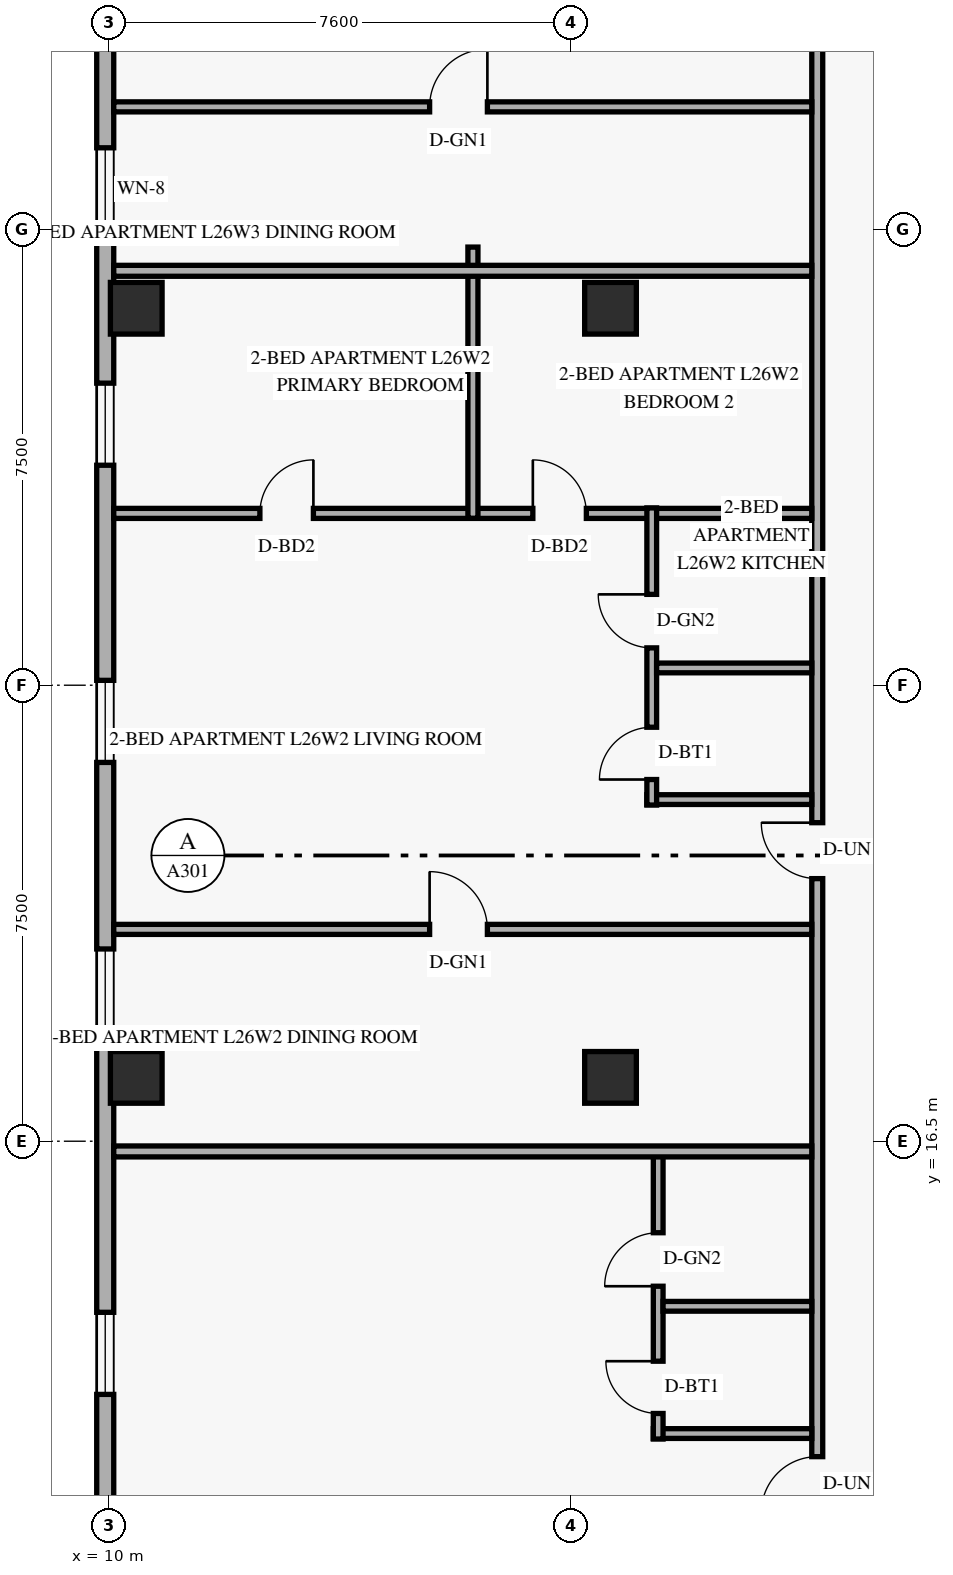
"""IFC4 building model, lengths in metres.
Left out: names, types, materials, properties, quantities, classifications, styles, units other than length and angle.
Written with IfcOpenShell. Run it as: python <this file> out.ifc"""

import sys

from ifc_helpers import new_model, si_unit, direction, frame, frame_2d, origin, origin_2d, place, context, subcontext, project, spatial, rectangle, extrude, element, fill, save


model = new_model("IFC4")
c1 = context("Model", 3, precision=1e-05, world=origin(), true_north=direction((0.0, 1.0)))
c2 = subcontext(c1, "Body", "Model", "MODEL_VIEW")
j1 = project(units=[si_unit("LENGTHUNIT", "METRE"), si_unit("PLANEANGLEUNIT", "RADIAN")], contexts=[c1])
p1 = place(None, origin())
s1 = spatial("IfcSite", under=j1, at=p1, CompositionType="ELEMENT")
p2 = place(p1, origin())
s2 = spatial("IfcBuilding", under=s1, at=p2, CompositionType="ELEMENT")
p3 = place(p2, frame((0.0, 0.0, 102.6)))
s3 = spatial("IfcBuildingStorey", under=s2, at=p3, CompositionType="ELEMENT", Elevation=102.6)
for number, where, z_axis, x_axis in (
    (1, (10.45, 17.55, 0.0), (0.0, 0.0, 1.0), (1.0, 0.0, 0.0)),
    (2, (10.45, 30.2, 0.0), (0.0, 0.0, 1.0), (1.0, 0.0, 0.0)),
    (3, (18.25, 17.55, 0.0), (0.0, 0.0, 1.0), (1.0, 0.0, 0.0)),
    (4, (18.25, 30.2, 0.0), (0.0, 0.0, 1.0), (1.0, 0.0, 0.0)),
):
    element("IfcColumn", number, at=place(p3, frame(where, z_axis=z_axis, x_axis=x_axis)), inside=s3, PredefinedType="COLUMN", context=c2, shape_type="SweptSolid", body=[
        extrude(rectangle(XDim=0.85, YDim=0.85, at=origin_2d()), origin(), (0.0, 0.0, 1.0), 3.6),
    ])
p4 = place(p3, frame((9.94, 41.68, 0.0), z_axis=(0.0, 0.0, 1.0), x_axis=(0.0, -1.0, 0.0)))
e5 = element("IfcWall", 5, at=p4, inside=s3, PredefinedType="SOLIDWALL", context=c2, shape_type="SweptSolid", body=[
    extrude(rectangle(XDim=35.36, YDim=0.28, at=frame_2d((17.68, 0.0))), origin(), (0.0, 0.0, 1.0), 3.36),
])
p5 = place(p4, frame((27.994, 0.0, 0.85)))
e6 = element("IfcOpeningElement", 6, at=p5, cuts=e5, PredefinedType="OPENING", context=c2, shape_type="SweptSolid", body=[
    extrude(rectangle(XDim=1.35, YDim=1.55, at=frame_2d((0.675, 0.775))), frame((0.0, 0.15, 0.0), z_axis=(0.0, -1.0, 0.0), x_axis=(1.0, 0.0, 0.0)), (0.0, 0.0, 1.0), 0.3),
])
p6 = place(p4, frame((22.018, 0.0, 0.85)))
e7 = element("IfcOpeningElement", 7, at=p6, cuts=e5, PredefinedType="OPENING", context=c2, shape_type="SweptSolid", body=[
    extrude(rectangle(XDim=1.35, YDim=1.55, at=frame_2d((0.675, 0.775))), frame((0.0, 0.15, 0.0), z_axis=(0.0, -1.0, 0.0), x_axis=(1.0, 0.0, 0.0)), (0.0, 0.0, 1.0), 0.3),
])
p7 = place(p4, frame((17.6, 0.0, 0.85)))
e8 = element("IfcOpeningElement", 8, at=p7, cuts=e5, PredefinedType="OPENING", context=c2, shape_type="SweptSolid", body=[
    extrude(rectangle(XDim=1.35, YDim=1.55, at=frame_2d((0.675, 0.775))), frame((0.0, 0.15, 0.0), z_axis=(0.0, -1.0, 0.0), x_axis=(1.0, 0.0, 0.0)), (0.0, 0.0, 1.0), 0.3),
])
p8 = place(p4, frame((12.712, 0.0, 0.85)))
e9 = element("IfcOpeningElement", 9, at=p8, cuts=e5, PredefinedType="OPENING", context=c2, shape_type="SweptSolid", body=[
    extrude(rectangle(XDim=1.35, YDim=1.55, at=frame_2d((0.675, 0.775))), frame((0.0, 0.15, 0.0), z_axis=(0.0, -1.0, 0.0), x_axis=(1.0, 0.0, 0.0)), (0.0, 0.0, 1.0), 0.3),
])
p9 = place(p4, frame((8.841, 0.0, 0.85)))
e10 = element("IfcOpeningElement", 10, at=p9, cuts=e5, PredefinedType="OPENING", context=c2, shape_type="SweptSolid", body=[
    extrude(rectangle(XDim=1.35, YDim=1.55, at=frame_2d((0.675, 0.775))), frame((0.0, 0.15, 0.0), z_axis=(0.0, -1.0, 0.0), x_axis=(1.0, 0.0, 0.0)), (0.0, 0.0, 1.0), 0.3),
])
p10 = place(p4, frame((5.094, 0.0, 0.85)))
e11 = element("IfcOpeningElement", 11, at=p10, cuts=e5, PredefinedType="OPENING", context=c2, shape_type="SweptSolid", body=[
    extrude(rectangle(XDim=1.35, YDim=1.55, at=frame_2d((0.675, 0.775))), frame((0.0, 0.15, 0.0), z_axis=(0.0, -1.0, 0.0), x_axis=(1.0, 0.0, 0.0)), (0.0, 0.0, 1.0), 0.3),
])
p11 = place(p3, frame((21.65, 6.8, 0.0), z_axis=(0.0, 0.0, 1.0), x_axis=(0.0, 1.0, 0.0)))
e12 = element("IfcWall", 12, at=p11, inside=s3, PredefinedType="STANDARD", context=c2, shape_type="SweptSolid", body=[
    extrude(rectangle(XDim=34.4, YDim=0.18, at=frame_2d((17.2, 0.0))), origin(), (0.0, 0.0, 1.0), 2.731),
])
p12 = place(p11, frame((3.592, 0.0, 0.0)))
e13 = element("IfcOpeningElement", 13, at=p12, cuts=e12, PredefinedType="OPENING", context=c2, shape_type="SweptSolid", body=[
    extrude(rectangle(XDim=0.92, YDim=2.15, at=frame_2d((0.46, 1.075))), frame((0.0, 0.1, 0.0), z_axis=(0.0, -1.0, 0.0), x_axis=(1.0, 0.0, 0.0)), (0.0, 0.0, 1.0), 0.2),
])
p13 = place(p11, frame((14.019, 0.0, 0.0)))
e14 = element("IfcOpeningElement", 14, at=p13, cuts=e12, PredefinedType="OPENING", context=c2, shape_type="SweptSolid", body=[
    extrude(rectangle(XDim=0.92, YDim=2.15, at=frame_2d((0.46, 1.075))), frame((0.0, 0.1, 0.0), z_axis=(0.0, -1.0, 0.0), x_axis=(1.0, 0.0, 0.0)), (0.0, 0.0, 1.0), 0.2),
])
p14 = place(p11, frame((28.675, 0.0, 0.0)))
e15 = element("IfcOpeningElement", 15, at=p14, cuts=e12, PredefinedType="OPENING", context=c2, shape_type="SweptSolid", body=[
    extrude(rectangle(XDim=0.92, YDim=2.15, at=frame_2d((0.46, 1.075))), frame((0.0, 0.1, 0.0), z_axis=(0.0, -1.0, 0.0), x_axis=(1.0, 0.0, 0.0)), (0.0, 0.0, 1.0), 0.2),
])
p15 = place(p3, frame((18.954, 11.692, 0.0), z_axis=(0.0, 0.0, 1.0), x_axis=(1.0, 0.0, 0.0)))
e16 = element("IfcWall", 16, at=p15, inside=s3, PredefinedType="PLUMBINGWALL", context=c2, shape_type="SweptSolid", body=[
    extrude(rectangle(XDim=2.606, YDim=0.16, at=frame_2d((1.303, 0.0))), origin(), (0.0, 0.0, 1.0), 3.36),
])
p16 = place(p3, frame((19.034, 11.602, 0.0), z_axis=(0.0, 0.0, 1.0), x_axis=(0.0, 1.0, 0.0)))
e17 = element("IfcWall", 17, at=p16, inside=s3, PredefinedType="PLUMBINGWALL", context=c2, shape_type="SweptSolid", body=[
    extrude(rectangle(XDim=4.73, YDim=0.16, at=frame_2d((2.365, 0.0))), origin(), (0.0, 0.0, 1.0), 2.988),
])
p17 = place(p16, frame((0.42, 0.0, 0.0)))
e18 = element("IfcOpeningElement", 18, at=p17, cuts=e17, PredefinedType="OPENING", context=c2, shape_type="SweptSolid", body=[
    extrude(rectangle(XDim=0.86, YDim=2.12, at=frame_2d((0.43, 1.06))), frame((0.0, 0.09, 0.0), z_axis=(0.0, -1.0, 0.0), x_axis=(1.0, 0.0, 0.0)), (0.0, 0.0, 1.0), 0.18),
])
p18 = place(p16, frame((2.513, 0.0, 0.0)))
e19 = element("IfcOpeningElement", 19, at=p18, cuts=e17, PredefinedType="OPENING", context=c2, shape_type="SweptSolid", body=[
    extrude(rectangle(XDim=0.88, YDim=2.12, at=frame_2d((0.44, 1.06))), frame((0.0, 0.09, 0.0), z_axis=(0.0, -1.0, 0.0), x_axis=(1.0, 0.0, 0.0)), (0.0, 0.0, 1.0), 0.18),
])
p19 = place(p3, frame((19.114, 13.785, 0.0), z_axis=(0.0, 0.0, 1.0), x_axis=(1.0, 0.0, 0.0)))
e20 = element("IfcWall", 20, at=p19, inside=s3, PredefinedType="PLUMBINGWALL", context=c2, shape_type="SweptSolid", body=[
    extrude(rectangle(XDim=2.446, YDim=0.16, at=frame_2d((1.223, 0.0))), origin(), (0.0, 0.0, 1.0), 2.988),
])
p20 = place(p3, frame((10.08, 16.332, 0.0), z_axis=(0.0, 0.0, 1.0), x_axis=(1.0, 0.0, 0.0)))
e21 = element("IfcWall", 21, at=p20, inside=s3, PredefinedType="PARTITIONING", context=c2, shape_type="SweptSolid", body=[
    extrude(rectangle(XDim=11.48, YDim=0.18, at=frame_2d((5.74, 0.0))), origin(), (0.0, 0.0, 1.0), 2.731),
])
p21 = place(p3, frame((10.08, 26.826, 0.0), z_axis=(0.0, 0.0, 1.0), x_axis=(1.0, 0.0, 0.0)))
e22 = element("IfcWall", 22, at=p21, inside=s3, PredefinedType="PARTITIONING", context=c2, shape_type="SweptSolid", body=[
    extrude(rectangle(XDim=11.48, YDim=0.165, at=frame_2d((5.74, 0.0))), origin(), (0.0, 0.0, 1.0), 2.731),
])
p22 = place(p21, frame((2.404, 0.0, 0.0)))
e23 = element("IfcOpeningElement", 23, at=p22, cuts=e22, PredefinedType="OPENING", context=c2, shape_type="SweptSolid", body=[
    extrude(rectangle(XDim=0.88, YDim=2.14, at=frame_2d((0.44, 1.07))), frame((0.0, 0.093, 0.0), z_axis=(0.0, -1.0, 0.0), x_axis=(1.0, 0.0, 0.0)), (0.0, 0.0, 1.0), 0.185),
])
p23 = place(p21, frame((6.893, 0.0, 0.0)))
e24 = element("IfcOpeningElement", 24, at=p23, cuts=e22, PredefinedType="OPENING", context=c2, shape_type="SweptSolid", body=[
    extrude(rectangle(XDim=0.88, YDim=2.14, at=frame_2d((0.44, 1.07))), frame((0.0, 0.093, 0.0), z_axis=(0.0, -1.0, 0.0), x_axis=(1.0, 0.0, 0.0)), (0.0, 0.0, 1.0), 0.185),
])
p24 = place(p3, frame((18.848, 22.119, 0.0), z_axis=(0.0, 0.0, 1.0), x_axis=(1.0, 0.0, 0.0)))
e25 = element("IfcWall", 25, at=p24, inside=s3, PredefinedType="PLUMBINGWALL", context=c2, shape_type="SweptSolid", body=[
    extrude(rectangle(XDim=2.712, YDim=0.16, at=frame_2d((1.356, 0.0))), origin(), (0.0, 0.0, 1.0), 3.36),
])
p25 = place(p3, frame((18.928, 22.029, 0.0), z_axis=(0.0, 0.0, 1.0), x_axis=(0.0, 1.0, 0.0)))
e26 = element("IfcWall", 26, at=p25, inside=s3, PredefinedType="PLUMBINGWALL", context=c2, shape_type="SweptSolid", body=[
    extrude(rectangle(XDim=4.887, YDim=0.16, at=frame_2d((2.443, 0.0))), origin(), (0.0, 0.0, 1.0), 3.36),
])
p26 = place(p25, frame((0.42, 0.0, 0.0)))
e27 = element("IfcOpeningElement", 27, at=p26, cuts=e26, PredefinedType="OPENING", context=c2, shape_type="SweptSolid", body=[
    extrude(rectangle(XDim=0.86, YDim=2.12, at=frame_2d((0.43, 1.06))), frame((0.0, 0.09, 0.0), z_axis=(0.0, -1.0, 0.0), x_axis=(1.0, 0.0, 0.0)), (0.0, 0.0, 1.0), 0.18),
])
p27 = place(p25, frame((2.585, 0.0, 0.0)))
e28 = element("IfcOpeningElement", 28, at=p27, cuts=e26, PredefinedType="OPENING", context=c2, shape_type="SweptSolid", body=[
    extrude(rectangle(XDim=0.88, YDim=2.12, at=frame_2d((0.44, 1.06))), frame((0.0, 0.09, 0.0), z_axis=(0.0, -1.0, 0.0), x_axis=(1.0, 0.0, 0.0)), (0.0, 0.0, 1.0), 0.18),
])
p28 = place(p3, frame((19.008, 24.284, 0.0), z_axis=(0.0, 0.0, 1.0), x_axis=(1.0, 0.0, 0.0)))
e29 = element("IfcWall", 29, at=p28, inside=s3, PredefinedType="PLUMBINGWALL", context=c2, shape_type="SweptSolid", body=[
    extrude(rectangle(XDim=2.552, YDim=0.16, at=frame_2d((1.276, 0.0))), origin(), (0.0, 0.0, 1.0), 3.36),
])
p29 = place(p3, frame((10.08, 19.984, 0.0), z_axis=(0.0, 0.0, 1.0), x_axis=(1.0, 0.0, 0.0)))
e30 = element("IfcWall", 30, at=p29, inside=s3, PredefinedType="PARTITIONING", context=c2, shape_type="SweptSolid", body=[
    extrude(rectangle(XDim=11.48, YDim=0.165, at=frame_2d((5.74, 0.0))), origin(), (0.0, 0.0, 1.0), 2.731),
])
p30 = place(p29, frame((5.195, 0.0, 0.0)))
e31 = element("IfcOpeningElement", 31, at=p30, cuts=e30, PredefinedType="OPENING", context=c2, shape_type="SweptSolid", body=[
    extrude(rectangle(XDim=0.95, YDim=2.15, at=frame_2d((0.475, 1.075))), frame((0.0, 0.093, 0.0), z_axis=(0.0, -1.0, 0.0), x_axis=(1.0, 0.0, 0.0)), (0.0, 0.0, 1.0), 0.185),
])
p31 = place(p3, frame((15.987, 26.746, 0.0), z_axis=(0.0, 0.0, 1.0), x_axis=(0.0, 1.0, 0.0)))
e32 = element("IfcWall", 32, at=p31, inside=s3, PredefinedType="PARTITIONING", context=c2, shape_type="SweptSolid", body=[
    extrude(rectangle(XDim=4.46, YDim=0.165, at=frame_2d((2.23, 0.0))), origin(), (0.0, 0.0, 1.0), 2.731),
])
p32 = place(p3, frame((10.08, 30.816, 0.0), z_axis=(0.0, 0.0, 1.0), x_axis=(1.0, 0.0, 0.0)))
e33 = element("IfcWall", 33, at=p32, inside=s3, PredefinedType="PARTITIONING", context=c2, shape_type="SweptSolid", body=[
    extrude(rectangle(XDim=11.48, YDim=0.18, at=frame_2d((5.74, 0.0))), origin(), (0.0, 0.0, 1.0), 2.731),
])
p33 = place(p3, frame((10.08, 33.512, 0.0), z_axis=(0.0, 0.0, 1.0), x_axis=(1.0, 0.0, 0.0)))
e34 = element("IfcWall", 34, at=p33, inside=s3, PredefinedType="PARTITIONING", context=c2, shape_type="SweptSolid", body=[
    extrude(rectangle(XDim=11.48, YDim=0.165, at=frame_2d((5.74, 0.0))), origin(), (0.0, 0.0, 1.0), 2.731),
])
p34 = place(p33, frame((5.195, 0.0, 0.0)))
e35 = element("IfcOpeningElement", 35, at=p34, cuts=e34, PredefinedType="OPENING", context=c2, shape_type="SweptSolid", body=[
    extrude(rectangle(XDim=0.95, YDim=2.15, at=frame_2d((0.475, 1.075))), frame((0.0, 0.093, 0.0), z_axis=(0.0, -1.0, 0.0), x_axis=(1.0, 0.0, 0.0)), (0.0, 0.0, 1.0), 0.185),
])
p35 = place(p5, origin())
e36 = element("IfcWindow", 36, at=p35, inside=s3, PartitioningType="SINGLE_PANEL", PredefinedType="WINDOW", context=c2, shape_type="SweptSolid", body=[
    extrude(rectangle(XDim=1.35, YDim=1.55, at=frame_2d((0.675, 0.775))), frame((0.0, 0.03, 0.0), z_axis=(0.0, -1.0, 0.0), x_axis=(1.0, 0.0, 0.0)), (0.0, 0.0, 1.0), 0.06),
])
fill(e6, e36)
p36 = place(p6, origin())
e37 = element("IfcWindow", 37, at=p36, inside=s3, PartitioningType="SINGLE_PANEL", PredefinedType="WINDOW", context=c2, shape_type="SweptSolid", body=[
    extrude(rectangle(XDim=1.35, YDim=1.55, at=frame_2d((0.675, 0.775))), frame((0.0, 0.03, 0.0), z_axis=(0.0, -1.0, 0.0), x_axis=(1.0, 0.0, 0.0)), (0.0, 0.0, 1.0), 0.06),
])
fill(e7, e37)
p37 = place(p7, origin())
e38 = element("IfcWindow", 38, at=p37, inside=s3, PartitioningType="SINGLE_PANEL", PredefinedType="WINDOW", context=c2, shape_type="SweptSolid", body=[
    extrude(rectangle(XDim=1.35, YDim=1.55, at=frame_2d((0.675, 0.775))), frame((0.0, 0.03, 0.0), z_axis=(0.0, -1.0, 0.0), x_axis=(1.0, 0.0, 0.0)), (0.0, 0.0, 1.0), 0.06),
])
fill(e8, e38)
p38 = place(p8, origin())
e39 = element("IfcWindow", 39, at=p38, inside=s3, PartitioningType="SINGLE_PANEL", PredefinedType="WINDOW", context=c2, shape_type="SweptSolid", body=[
    extrude(rectangle(XDim=1.35, YDim=1.55, at=frame_2d((0.675, 0.775))), frame((0.0, 0.03, 0.0), z_axis=(0.0, -1.0, 0.0), x_axis=(1.0, 0.0, 0.0)), (0.0, 0.0, 1.0), 0.06),
])
fill(e9, e39)
p39 = place(p9, origin())
e40 = element("IfcWindow", 40, at=p39, inside=s3, PartitioningType="SINGLE_PANEL", PredefinedType="WINDOW", context=c2, shape_type="SweptSolid", body=[
    extrude(rectangle(XDim=1.35, YDim=1.55, at=frame_2d((0.675, 0.775))), frame((0.0, 0.03, 0.0), z_axis=(0.0, -1.0, 0.0), x_axis=(1.0, 0.0, 0.0)), (0.0, 0.0, 1.0), 0.06),
])
fill(e10, e40)
p40 = place(p12, origin())
e41 = element("IfcDoor", 41, at=p40, inside=s3, OperationType="SINGLE_SWING_LEFT", PredefinedType="DOOR", context=c2, shape_type="SweptSolid", body=[
    extrude(rectangle(XDim=0.92, YDim=2.15, at=frame_2d((0.46, 1.075))), frame((0.0, 0.025, 0.0), z_axis=(0.0, -1.0, 0.0), x_axis=(1.0, 0.0, 0.0)), (0.0, 0.0, 1.0), 0.05),
])
fill(e13, e41)
p41 = place(p17, origin())
e42 = element("IfcDoor", 42, at=p41, inside=s3, OperationType="SINGLE_SWING_RIGHT", PredefinedType="DOOR", context=c2, shape_type="SweptSolid", body=[
    extrude(rectangle(XDim=0.86, YDim=2.12, at=frame_2d((0.43, 1.06))), frame((0.0, 0.025, 0.0), z_axis=(0.0, -1.0, 0.0), x_axis=(1.0, 0.0, 0.0)), (0.0, 0.0, 1.0), 0.05),
])
fill(e18, e42)
p42 = place(p18, origin())
e43 = element("IfcDoor", 43, at=p42, inside=s3, OperationType="SINGLE_SWING_LEFT", PredefinedType="DOOR", context=c2, shape_type="SweptSolid", body=[
    extrude(rectangle(XDim=0.88, YDim=2.12, at=frame_2d((0.44, 1.06))), frame((0.0, 0.025, 0.0), z_axis=(0.0, -1.0, 0.0), x_axis=(1.0, 0.0, 0.0)), (0.0, 0.0, 1.0), 0.05),
])
fill(e19, e43)
p43 = place(p30, origin())
e44 = element("IfcDoor", 44, at=p43, inside=s3, OperationType="SINGLE_SWING_LEFT", PredefinedType="DOOR", context=c2, shape_type="SweptSolid", body=[
    extrude(rectangle(XDim=0.95, YDim=2.15, at=frame_2d((0.475, 1.075))), frame((0.0, 0.025, 0.0), z_axis=(0.0, -1.0, 0.0), x_axis=(1.0, 0.0, 0.0)), (0.0, 0.0, 1.0), 0.05),
])
fill(e31, e44)
p44 = place(p13, origin())
e45 = element("IfcDoor", 45, at=p44, inside=s3, OperationType="SINGLE_SWING_RIGHT", PredefinedType="DOOR", context=c2, shape_type="SweptSolid", body=[
    extrude(rectangle(XDim=0.92, YDim=2.15, at=frame_2d((0.46, 1.075))), frame((0.0, 0.025, 0.0), z_axis=(0.0, -1.0, 0.0), x_axis=(1.0, 0.0, 0.0)), (0.0, 0.0, 1.0), 0.05),
])
fill(e14, e45)
p45 = place(p26, origin())
e46 = element("IfcDoor", 46, at=p45, inside=s3, OperationType="SINGLE_SWING_LEFT", PredefinedType="DOOR", context=c2, shape_type="SweptSolid", body=[
    extrude(rectangle(XDim=0.86, YDim=2.12, at=frame_2d((0.43, 1.06))), frame((0.0, 0.025, 0.0), z_axis=(0.0, -1.0, 0.0), x_axis=(1.0, 0.0, 0.0)), (0.0, 0.0, 1.0), 0.05),
])
fill(e27, e46)
p46 = place(p27, origin())
e47 = element("IfcDoor", 47, at=p46, inside=s3, OperationType="SINGLE_SWING_RIGHT", PredefinedType="DOOR", context=c2, shape_type="SweptSolid", body=[
    extrude(rectangle(XDim=0.88, YDim=2.12, at=frame_2d((0.44, 1.06))), frame((0.0, 0.025, 0.0), z_axis=(0.0, -1.0, 0.0), x_axis=(1.0, 0.0, 0.0)), (0.0, 0.0, 1.0), 0.05),
])
fill(e28, e47)
p47 = place(p22, origin())
e48 = element("IfcDoor", 48, at=p47, inside=s3, OperationType="SINGLE_SWING_RIGHT", PredefinedType="DOOR", context=c2, shape_type="SweptSolid", body=[
    extrude(rectangle(XDim=0.88, YDim=2.14, at=frame_2d((0.44, 1.07))), frame((0.0, 0.025, 0.0), z_axis=(0.0, -1.0, 0.0), x_axis=(1.0, 0.0, 0.0)), (0.0, 0.0, 1.0), 0.05),
])
fill(e23, e48)
p48 = place(p23, origin())
e49 = element("IfcDoor", 49, at=p48, inside=s3, OperationType="SINGLE_SWING_LEFT", PredefinedType="DOOR", context=c2, shape_type="SweptSolid", body=[
    extrude(rectangle(XDim=0.88, YDim=2.14, at=frame_2d((0.44, 1.07))), frame((0.0, 0.025, 0.0), z_axis=(0.0, -1.0, 0.0), x_axis=(1.0, 0.0, 0.0)), (0.0, 0.0, 1.0), 0.05),
])
fill(e24, e49)
p49 = place(p34, origin())
e50 = element("IfcDoor", 50, at=p49, inside=s3, OperationType="SINGLE_SWING_RIGHT", PredefinedType="DOOR", context=c2, shape_type="SweptSolid", body=[
    extrude(rectangle(XDim=0.95, YDim=2.15, at=frame_2d((0.475, 1.075))), frame((0.0, 0.025, 0.0), z_axis=(0.0, -1.0, 0.0), x_axis=(1.0, 0.0, 0.0)), (0.0, 0.0, 1.0), 0.05),
])
fill(e35, e50)
save(model, sys.argv[1])
